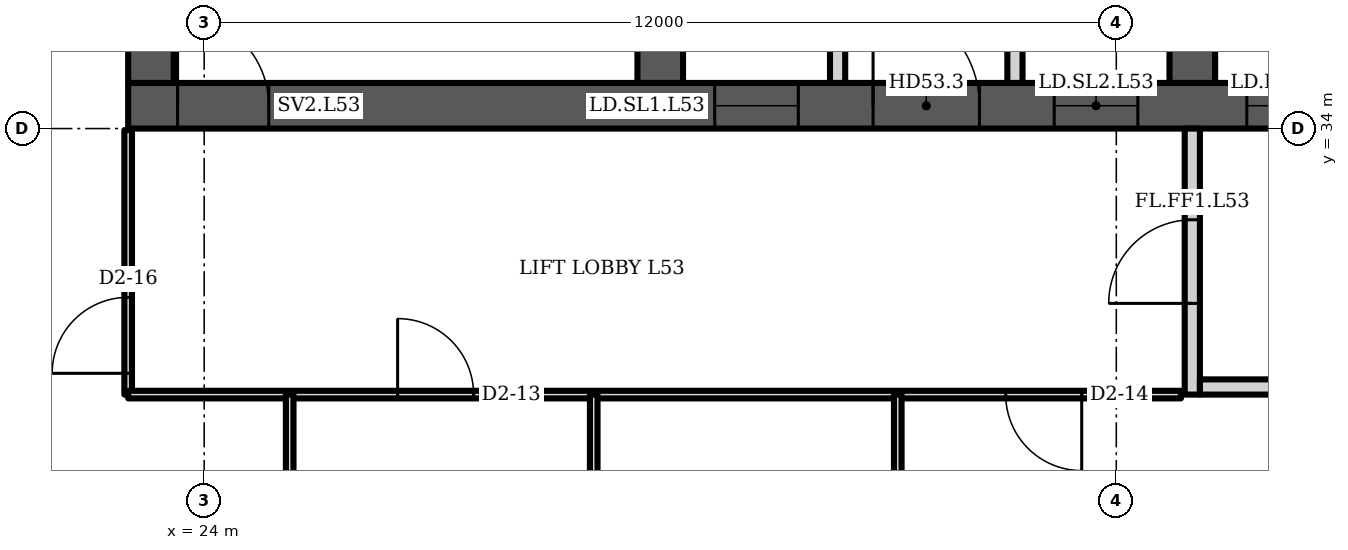
"""IFC4 building model, lengths in metres.
Left out: names, types, materials, properties, quantities, classifications, styles, units other than length and angle.
Written with IfcOpenShell. Run it as: python <this file> out.ifc"""

import sys

from ifc_helpers import new_model, si_unit, direction, frame, frame_2d, origin, place, context, subcontext, project, spatial, polyline, rectangle, outline, extrude, element, fill, save


model = new_model("IFC4")
c1 = context("Model", 3, precision=1e-05, world=origin(), true_north=direction((0.0, 1.0)))
c2 = subcontext(c1, "Body", "Model", "MODEL_VIEW")
j1 = project(units=[si_unit("LENGTHUNIT", "METRE"), si_unit("PLANEANGLEUNIT", "RADIAN")], contexts=[c1])
p1 = place(None, origin())
s1 = spatial("IfcSite", under=j1, at=p1, CompositionType="ELEMENT")
p2 = place(p1, origin())
s2 = spatial("IfcBuilding", under=s1, at=p2, CompositionType="ELEMENT")
p3 = place(p2, frame((0.0, 0.0, 214.3)))
s3 = spatial("IfcBuildingStorey", under=s2, at=p3, CompositionType="ELEMENT", Elevation=214.3)
p4 = place(p3, frame((23.0, 34.3, 0.0), z_axis=(0.0, 0.0, 1.0), x_axis=(1.0, 0.0, 0.0)))
e1 = element("IfcWall", 1, at=p4, inside=s3, PredefinedType="SHEAR", context=c2, shape_type="SweptSolid", body=[
    extrude(rectangle(XDim=35.0, YDim=0.6, at=frame_2d((17.5, 0.0))), origin(), (0.0, 0.0, 1.0), 3.6),
])
p5 = place(p4, frame((0.65, 0.0, 0.0)))
e2 = element("IfcOpeningElement", 2, at=p5, cuts=e1, PredefinedType="OPENING", context=c2, shape_type="SweptSolid", body=[
    extrude(rectangle(XDim=1.2, YDim=2.1, at=frame_2d((0.6, 1.05))), frame((0.0, 0.31, 0.0), z_axis=(0.0, -1.0, 0.0), x_axis=(1.0, 0.0, 0.0)), (0.0, 0.0, 1.0), 0.62),
])
p6 = place(p4, frame((7.717, 0.0, 0.0)))
e3 = element("IfcOpeningElement", 3, at=p6, cuts=e1, PredefinedType="OPENING", context=c2, shape_type="SweptSolid", body=[
    extrude(rectangle(XDim=1.1, YDim=2.1, at=frame_2d((0.55, 1.05))), frame((0.0, 0.31, 0.0), z_axis=(0.0, -1.0, 0.0), x_axis=(1.0, 0.0, 0.0)), (0.0, 0.0, 1.0), 0.62),
])
p7 = place(p4, frame((12.183, 0.0, 0.0)))
e4 = element("IfcOpeningElement", 4, at=p7, cuts=e1, PredefinedType="OPENING", context=c2, shape_type="SweptSolid", body=[
    extrude(rectangle(XDim=1.1, YDim=2.1, at=frame_2d((0.55, 1.05))), frame((0.0, 0.31, 0.0), z_axis=(0.0, -1.0, 0.0), x_axis=(1.0, 0.0, 0.0)), (0.0, 0.0, 1.0), 0.62),
])
p8 = place(p4, frame((9.8, 0.0, 0.0)))
e5 = element("IfcOpeningElement", 5, at=p8, cuts=e1, PredefinedType="OPENING", context=c2, shape_type="SweptSolid", body=[
    extrude(rectangle(XDim=1.4, YDim=2.1, at=frame_2d((0.7, 1.05))), frame((0.0, 0.31, 0.0), z_axis=(0.0, -1.0, 0.0), x_axis=(1.0, 0.0, 0.0)), (0.0, 0.0, 1.0), 0.62),
])
p9 = place(p4, frame((14.717, 0.0, 0.0)))
e6 = element("IfcOpeningElement", 6, at=p9, cuts=e1, PredefinedType="OPENING", context=c2, shape_type="SweptSolid", body=[
    extrude(rectangle(XDim=1.1, YDim=2.1, at=frame_2d((0.55, 1.05))), frame((0.0, 0.31, 0.0), z_axis=(0.0, -1.0, 0.0), x_axis=(1.0, 0.0, 0.0)), (0.0, 0.0, 1.0), 0.62),
])
p10 = place(p4, frame((16.95, 0.0, 0.0)))
e7 = element("IfcOpeningElement", 7, at=p10, cuts=e1, PredefinedType="OPENING", context=c2, shape_type="SweptSolid", body=[
    extrude(rectangle(XDim=1.1, YDim=2.1, at=frame_2d((0.55, 1.05))), frame((0.0, 0.31, 0.0), z_axis=(0.0, -1.0, 0.0), x_axis=(1.0, 0.0, 0.0)), (0.0, 0.0, 1.0), 0.62),
])
p11 = place(p4, frame((19.183, 0.0, 0.0)))
e8 = element("IfcOpeningElement", 8, at=p11, cuts=e1, PredefinedType="OPENING", context=c2, shape_type="SweptSolid", body=[
    extrude(rectangle(XDim=1.1, YDim=2.1, at=frame_2d((0.55, 1.05))), frame((0.0, 0.31, 0.0), z_axis=(0.0, -1.0, 0.0), x_axis=(1.0, 0.0, 0.0)), (0.0, 0.0, 1.0), 0.62),
])
p12 = place(p4, frame((26.15, 0.0, 0.0)))
e9 = element("IfcOpeningElement", 9, at=p12, cuts=e1, PredefinedType="OPENING", context=c2, shape_type="SweptSolid", body=[
    extrude(rectangle(XDim=1.2, YDim=2.1, at=frame_2d((0.6, 1.05))), frame((0.0, 0.31, 0.0), z_axis=(0.0, -1.0, 0.0), x_axis=(1.0, 0.0, 0.0)), (0.0, 0.0, 1.0), 0.62),
])
p13 = place(p4, frame((30.8, 0.0, 0.0)))
e10 = element("IfcOpeningElement", 10, at=p13, cuts=e1, PredefinedType="OPENING", context=c2, shape_type="SweptSolid", body=[
    extrude(rectangle(XDim=1.4, YDim=2.1, at=frame_2d((0.7, 1.05))), frame((0.0, 0.31, 0.0), z_axis=(0.0, -1.0, 0.0), x_axis=(1.0, 0.0, 0.0)), (0.0, 0.0, 1.0), 0.62),
])
p14 = place(p3, frame((23.3, 34.6, 0.0), z_axis=(0.0, 0.0, 1.0), x_axis=(0.0, 1.0, 0.0)))
e11 = element("IfcWall", 11, at=p14, inside=s3, PredefinedType="SHEAR", context=c2, shape_type="SweptSolid", body=[
    extrude(rectangle(XDim=13.585, YDim=0.6, at=frame_2d((6.792, 0.0))), origin(), (0.0, 0.0, 1.0), 3.6),
])
p15 = place(p3, frame((30.0, 34.6, 0.0), z_axis=(0.0, 0.0, 1.0), x_axis=(0.0, 1.0, 0.0)))
e12 = element("IfcWall", 12, at=p15, inside=s3, PredefinedType="SHEAR", context=c2, shape_type="SweptSolid", body=[
    extrude(rectangle(XDim=14.171, YDim=0.6, at=frame_2d((7.085, 0.0))), origin(), (0.0, 0.0, 1.0), 3.6),
])
p16 = place(p15, frame((3.8, 0.0, 0.0)))
e13 = element("IfcOpeningElement", 13, at=p16, cuts=e12, PredefinedType="OPENING", context=c2, shape_type="SweptSolid", body=[
    extrude(rectangle(XDim=1.1, YDim=2.1, at=frame_2d((0.55, 1.05))), frame((0.0, 0.31, 0.0), z_axis=(0.0, -1.0, 0.0), x_axis=(1.0, 0.0, 0.0)), (0.0, 0.0, 1.0), 0.62),
])
p17 = place(p3, frame((37.0, 34.6, 0.0), z_axis=(0.0, 0.0, 1.0), x_axis=(0.0, 1.0, 0.0)))
e14 = element("IfcWall", 14, at=p17, inside=s3, PredefinedType="SHEAR", context=c2, shape_type="SweptSolid", body=[
    extrude(rectangle(XDim=14.784, YDim=0.6, at=frame_2d((7.392, 0.0))), origin(), (0.0, 0.0, 1.0), 3.6),
])
p18 = place(p17, frame((11.302, 0.0, 0.0)))
e15 = element("IfcOpeningElement", 15, at=p18, cuts=e14, PredefinedType="OPENING", context=c2, shape_type="SweptSolid", body=[
    extrude(rectangle(XDim=1.0, YDim=2.1, at=frame_2d((0.5, 1.05))), frame((0.0, 0.31, 0.0), z_axis=(0.0, -1.0, 0.0), x_axis=(1.0, 0.0, 0.0)), (0.0, 0.0, 1.0), 0.62),
])
p19 = place(p17, frame((3.8, 0.0, 0.0)))
e16 = element("IfcOpeningElement", 16, at=p19, cuts=e14, PredefinedType="OPENING", context=c2, shape_type="SweptSolid", body=[
    extrude(rectangle(XDim=1.1, YDim=2.1, at=frame_2d((0.55, 1.05))), frame((0.0, 0.31, 0.0), z_axis=(0.0, -1.0, 0.0), x_axis=(1.0, 0.0, 0.0)), (0.0, 0.0, 1.0), 0.62),
])
p20 = place(p3, frame((0.0, 0.0, -0.0)))
e17 = element("IfcWall", 17, at=p20, inside=s3, PredefinedType="PARTITIONING", context=c2, shape_type="SweptSolid", body=[
    extrude(outline(polyline([(32.233, 37.45), (30.3, 37.45), (30.3, 37.65), (32.233, 37.65), (32.433, 37.65), (32.433, 34.6), (32.233, 34.6), (32.233, 37.45)])), origin(), (0.0, 0.0, 1.0), 3.2),
])
p21 = place(p3, frame((0.0, 0.0, -0.0)))
e18 = element("IfcWall", 18, at=p21, inside=s3, PredefinedType="PARTITIONING", context=c2, shape_type="SweptSolid", body=[
    extrude(outline(polyline([(34.567, 37.65), (34.767, 37.65), (36.7, 37.65), (36.7, 37.45), (34.767, 37.45), (34.767, 34.6), (34.567, 34.6), (34.567, 37.65)])), origin(), (0.0, 0.0, 1.0), 3.2),
])
p22 = place(p3, frame((0.0, 0.0, -0.0)))
e19 = element("IfcWall", 19, at=p22, inside=s3, PredefinedType="PARTITIONING", context=c2, shape_type="SweptSolid", body=[
    extrude(outline(polyline([(41.567, 37.1), (39.433, 37.1), (39.433, 34.6), (39.233, 34.6), (39.233, 37.45), (37.3, 37.45), (37.3, 37.65), (39.233, 37.65), (39.433, 37.65), (39.433, 37.3), (41.567, 37.3), (41.567, 37.35), (41.767, 37.35), (43.7, 37.35), (43.7, 37.15), (41.767, 37.15), (41.767, 34.6), (41.567, 34.6), (41.567, 37.1)])), origin(), (0.0, 0.0, 1.0), 3.2),
])
p23 = place(p3, frame((37.0, 30.5, 0.0), z_axis=(0.0, 0.0, 1.0), x_axis=(0.0, 1.0, 0.0)))
e20 = element("IfcWall", 20, at=p23, inside=s3, PredefinedType="PARTITIONING", context=c2, shape_type="SweptSolid", body=[
    extrude(rectangle(XDim=3.5, YDim=0.2, at=frame_2d((1.75, 0.0))), origin(), (0.0, 0.0, 1.0), 3.2),
])
p24 = place(p23, frame((1.2, 0.0, 0.0)))
e21 = element("IfcOpeningElement", 21, at=p24, cuts=e20, PredefinedType="OPENING", context=c2, shape_type="SweptSolid", body=[
    extrude(rectangle(XDim=1.1, YDim=2.1, at=frame_2d((0.55, 1.05))), frame((0.0, 0.11, 0.0), z_axis=(0.0, -1.0, 0.0), x_axis=(1.0, 0.0, 0.0)), (0.0, 0.0, 1.0), 0.22),
])
p25 = place(p3, frame((37.1, 30.6, 0.0), z_axis=(0.0, 0.0, 1.0), x_axis=(1.0, 0.0, 0.0)))
e22 = element("IfcWall", 22, at=p25, inside=s3, PredefinedType="PARTITIONING", context=c2, shape_type="SweptSolid", body=[
    extrude(rectangle(XDim=2.8, YDim=0.2, at=frame_2d((1.4, 0.0))), origin(), (0.0, 0.0, 1.0), 3.2),
])
p26 = place(p3, frame((23.0, 30.5, 0.0), z_axis=(0.0, 0.0, 1.0), x_axis=(0.0, 1.0, 0.0)))
e23 = element("IfcWall", 23, at=p26, inside=s3, PredefinedType="PARTITIONING", context=c2, shape_type="SweptSolid", body=[
    extrude(rectangle(XDim=3.48, YDim=0.1, at=frame_2d((1.74, 0.0))), origin(), (0.0, 0.0, 1.0), 3.2),
])
p27 = place(p26, frame((0.28, 0.0, 0.0)))
e24 = element("IfcOpeningElement", 24, at=p27, cuts=e23, PredefinedType="OPENING", context=c2, shape_type="SweptSolid", body=[
    extrude(rectangle(XDim=1.0, YDim=2.1, at=frame_2d((0.5, 1.05))), frame((0.0, 0.06, 0.0), z_axis=(0.0, -1.0, 0.0), x_axis=(1.0, 0.0, 0.0)), (0.0, 0.0, 1.0), 0.12),
])
p28 = place(p3, frame((23.0, 30.5, 0.0), z_axis=(0.0, 0.0, 1.0), x_axis=(1.0, 0.0, 0.0)))
e25 = element("IfcWall", 25, at=p28, inside=s3, PredefinedType="PARTITIONING", context=c2, shape_type="SweptSolid", body=[
    extrude(rectangle(XDim=13.85, YDim=0.1, at=frame_2d((6.925, 0.0))), origin(), (0.0, 0.0, 1.0), 3.2),
])
p29 = place(p28, frame((3.545, 0.0, 0.0)))
e26 = element("IfcOpeningElement", 26, at=p29, cuts=e25, PredefinedType="OPENING", context=c2, shape_type="SweptSolid", body=[
    extrude(rectangle(XDim=1.0, YDim=2.1, at=frame_2d((0.5, 1.05))), frame((0.0, 0.06, 0.0), z_axis=(0.0, -1.0, 0.0), x_axis=(1.0, 0.0, 0.0)), (0.0, 0.0, 1.0), 0.12),
])
p30 = place(p28, frame((11.545, 0.0, 0.0)))
e27 = element("IfcOpeningElement", 27, at=p30, cuts=e25, PredefinedType="OPENING", context=c2, shape_type="SweptSolid", body=[
    extrude(rectangle(XDim=1.0, YDim=2.1, at=frame_2d((0.5, 1.05))), frame((0.0, 0.06, 0.0), z_axis=(0.0, -1.0, 0.0), x_axis=(1.0, 0.0, 0.0)), (0.0, 0.0, 1.0), 0.12),
])
p31 = place(p3, frame((25.125, 23.0, 0.0), z_axis=(0.0, 0.0, 1.0), x_axis=(0.0, 1.0, 0.0)))
e28 = element("IfcWall", 28, at=p31, inside=s3, PredefinedType="PARTITIONING", context=c2, shape_type="SweptSolid", body=[
    extrude(rectangle(XDim=7.5, YDim=0.1, at=frame_2d((3.75, 0.0))), origin(), (0.0, 0.0, 1.0), 3.2),
])
for number, where, z_axis, x_axis in (
    (29, (29.125, 19.2, 0.0), (0.0, 0.0, 1.0), (0.0, 1.0, 0.0)),
    (30, (33.125, 19.2, 0.0), (0.0, 0.0, 1.0), (0.0, 1.0, 0.0)),
):
    element("IfcWall", number, at=place(p3, frame(where, z_axis=z_axis, x_axis=x_axis)), inside=s3, PredefinedType="PARTITIONING", context=c2, shape_type="SweptSolid", body=[
        extrude(rectangle(XDim=11.3, YDim=0.1, at=frame_2d((5.65, 0.0))), origin(), (0.0, 0.0, 1.0), 3.2),
    ])
p32 = place(p5, origin())
e31 = element("IfcDoor", 31, at=p32, inside=s3, OperationType="SINGLE_SWING_LEFT", PredefinedType="DOOR", context=c2, shape_type="SweptSolid", body=[
    extrude(rectangle(XDim=1.2, YDim=2.1, at=frame_2d((0.6, 1.05))), frame((0.0, 0.025, 0.0), z_axis=(0.0, -1.0, 0.0), x_axis=(1.0, 0.0, 0.0)), (0.0, 0.0, 1.0), 0.05),
])
fill(e2, e31)
p33 = place(p6, origin())
e32 = element("IfcDoor", 32, at=p33, inside=s3, OperationType="DOUBLE_DOOR_SLIDING", PredefinedType="DOOR", context=c2, shape_type="SweptSolid", body=[
    extrude(rectangle(XDim=1.1, YDim=2.1, at=frame_2d((0.55, 1.05))), frame((0.0, 0.025, 0.0), z_axis=(0.0, -1.0, 0.0), x_axis=(1.0, 0.0, 0.0)), (0.0, 0.0, 1.0), 0.05),
])
fill(e3, e32)
p34 = place(p7, origin())
e33 = element("IfcDoor", 33, at=p34, inside=s3, OperationType="DOUBLE_DOOR_SLIDING", PredefinedType="DOOR", context=c2, shape_type="SweptSolid", body=[
    extrude(rectangle(XDim=1.1, YDim=2.1, at=frame_2d((0.55, 1.05))), frame((0.0, 0.025, 0.0), z_axis=(0.0, -1.0, 0.0), x_axis=(1.0, 0.0, 0.0)), (0.0, 0.0, 1.0), 0.05),
])
fill(e4, e33)
p35 = place(p8, origin())
e34 = element("IfcDoor", 34, at=p35, inside=s3, OperationType="DOUBLE_DOOR_SINGLE_SWING", PredefinedType="DOOR", context=c2, shape_type="SweptSolid", body=[
    extrude(rectangle(XDim=1.4, YDim=2.1, at=frame_2d((0.7, 1.05))), frame((0.0, 0.025, 0.0), z_axis=(0.0, -1.0, 0.0), x_axis=(1.0, 0.0, 0.0)), (0.0, 0.0, 1.0), 0.05),
])
fill(e5, e34)
p36 = place(p9, origin())
e35 = element("IfcDoor", 35, at=p36, inside=s3, OperationType="DOUBLE_DOOR_SLIDING", PredefinedType="DOOR", context=c2, shape_type="SweptSolid", body=[
    extrude(rectangle(XDim=1.1, YDim=2.1, at=frame_2d((0.55, 1.05))), frame((0.0, 0.025, 0.0), z_axis=(0.0, -1.0, 0.0), x_axis=(1.0, 0.0, 0.0)), (0.0, 0.0, 1.0), 0.05),
])
fill(e6, e35)
p37 = place(p24, origin())
e36 = element("IfcDoor", 36, at=p37, inside=s3, OperationType="SINGLE_SWING_LEFT", PredefinedType="DOOR", context=c2, shape_type="SweptSolid", body=[
    extrude(rectangle(XDim=1.1, YDim=2.1, at=frame_2d((0.55, 1.05))), frame((0.0, 0.025, 0.0), z_axis=(0.0, -1.0, 0.0), x_axis=(1.0, 0.0, 0.0)), (0.0, 0.0, 1.0), 0.05),
])
fill(e21, e36)
p38 = place(p29, origin())
e37 = element("IfcDoor", 37, at=p38, inside=s3, OperationType="SINGLE_SWING_LEFT", PredefinedType="DOOR", context=c2, shape_type="SweptSolid", body=[
    extrude(rectangle(XDim=1.0, YDim=2.1, at=frame_2d((0.5, 1.05))), frame((0.0, 0.025, 0.0), z_axis=(0.0, -1.0, 0.0), x_axis=(1.0, 0.0, 0.0)), (0.0, 0.0, 1.0), 0.05),
])
fill(e26, e37)
p39 = place(p30, origin())
e38 = element("IfcDoor", 38, at=p39, inside=s3, OperationType="SINGLE_SWING_RIGHT", PredefinedType="DOOR", context=c2, shape_type="SweptSolid", body=[
    extrude(rectangle(XDim=1.0, YDim=2.1, at=frame_2d((0.5, 1.05))), frame((0.0, 0.025, 0.0), z_axis=(0.0, -1.0, 0.0), x_axis=(1.0, 0.0, 0.0)), (0.0, 0.0, 1.0), 0.05),
])
fill(e27, e38)
p40 = place(p27, origin())
e39 = element("IfcDoor", 39, at=p40, inside=s3, OperationType="SINGLE_SWING_LEFT", PredefinedType="DOOR", context=c2, shape_type="SweptSolid", body=[
    extrude(rectangle(XDim=1.0, YDim=2.1, at=frame_2d((0.5, 1.05))), frame((0.0, 0.025, 0.0), z_axis=(0.0, -1.0, 0.0), x_axis=(1.0, 0.0, 0.0)), (0.0, 0.0, 1.0), 0.05),
])
fill(e24, e39)
save(model, sys.argv[1])
